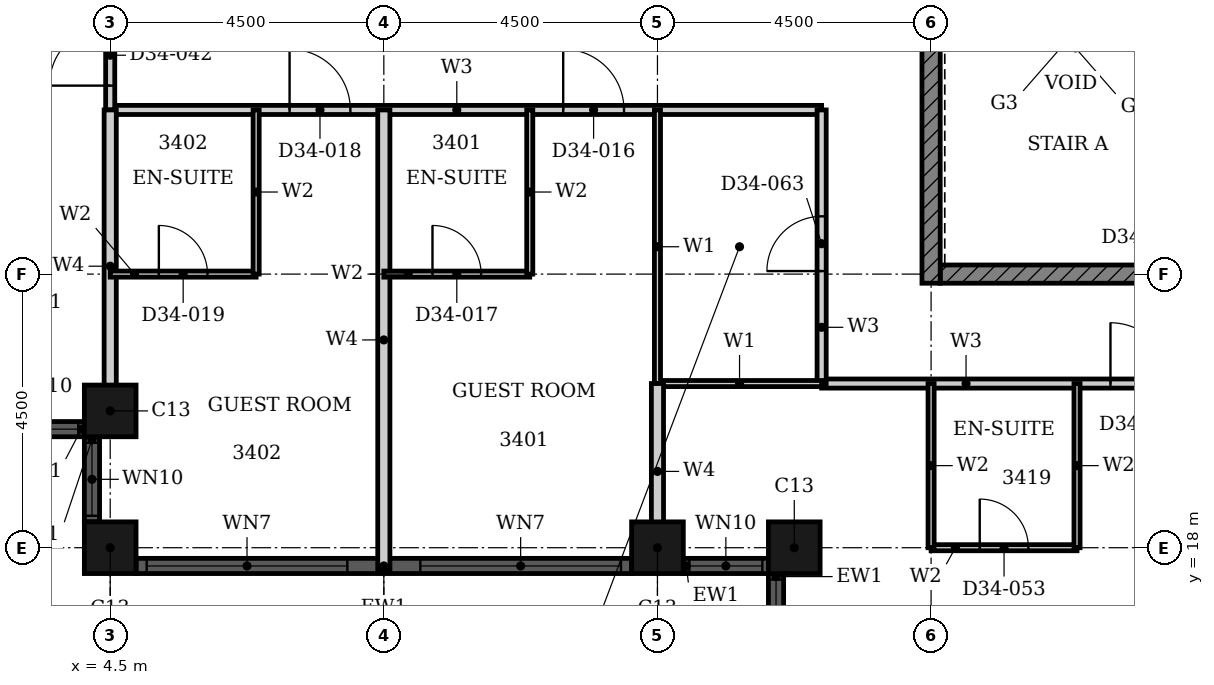
"""IFC4 building model, lengths in metres.
Left out: names, types, materials, properties, quantities, classifications, styles, units other than length and angle.
Written with IfcOpenShell. Run it as: python <this file> out.ifc"""

import sys

from ifc_helpers import new_model, si_unit, direction, frame, frame_2d, origin, origin_2d, place, context, subcontext, project, spatial, rectangle, hollow_rectangle, extrude, element, fill, save


model = new_model("IFC4")
c1 = context("Model", 3, precision=1e-05, world=origin(), true_north=direction((0.0, 1.0)))
c2 = subcontext(c1, "Body", "Model", "MODEL_VIEW")
j1 = project(units=[si_unit("LENGTHUNIT", "METRE"), si_unit("PLANEANGLEUNIT", "RADIAN")], contexts=[c1])
p1 = place(None, origin())
s1 = spatial("IfcSite", under=j1, at=p1, CompositionType="ELEMENT")
p2 = place(p1, origin())
s2 = spatial("IfcBuilding", under=s1, at=p2, CompositionType="ELEMENT")
p3 = place(p2, frame((0.0, 0.0, 136.8)))
s3 = spatial("IfcBuildingStorey", under=s2, at=p3, CompositionType="ELEMENT", Elevation=136.8)
for number, where, z_axis, x_axis in (
    (1, (4.5, 20.25, 0.0), (0.0, 0.0, 1.0), (1.0, 0.0, 0.0)),
    (2, (4.5, 18.0, 0.0), (0.0, 0.0, 1.0), (1.0, 0.0, 0.0)),
    (3, (13.5, 18.0, 0.0), (0.0, 0.0, 1.0), (1.0, 0.0, 0.0)),
    (4, (15.75, 18.0, 0.0), (0.0, 0.0, 1.0), (1.0, 0.0, 0.0)),
):
    element("IfcColumn", number, at=place(p3, frame(where, z_axis=z_axis, x_axis=x_axis)), inside=s3, PredefinedType="COLUMN", context=c2, shape_type="SweptSolid", body=[
        extrude(hollow_rectangle(XDim=0.85, YDim=0.85, WallThickness=0.026, at=origin_2d()), origin(), (0.0, 0.0, 1.0), 3.6),
    ])
p4 = place(p3, frame((2.675, 19.95, 0.0), z_axis=(0.0, 0.0, 1.0), x_axis=(1.0, 0.0, 0.0)))
e5 = element("IfcWall", 5, at=p4, inside=s3, PredefinedType="SOLIDWALL", context=c2, shape_type="SweptSolid", body=[
    extrude(rectangle(XDim=1.4, YDim=0.25, at=frame_2d((0.7, 0.0))), origin(), (0.0, 0.0, 1.0), 3.6),
])
p5 = place(p4, frame((0.1, 0.0, 0.9)))
e6 = element("IfcOpeningElement", 6, at=p5, cuts=e5, PredefinedType="OPENING", context=c2, shape_type="SweptSolid", body=[
    extrude(rectangle(XDim=1.2, YDim=1.85, at=frame_2d((0.6, 0.925))), frame((0.0, 0.135, 0.0), z_axis=(0.0, -1.0, 0.0), x_axis=(1.0, 0.0, 0.0)), (0.0, 0.0, 1.0), 0.27),
])
p6 = place(p3, frame((4.2, 19.825, 0.0), z_axis=(0.0, 0.0, 1.0), x_axis=(0.0, -1.0, 0.0)))
e7 = element("IfcWall", 7, at=p6, inside=s3, PredefinedType="SOLIDWALL", context=c2, shape_type="SweptSolid", body=[
    extrude(rectangle(XDim=1.4, YDim=0.25, at=frame_2d((0.7, 0.0))), origin(), (0.0, 0.0, 1.0), 3.6),
])
p7 = place(p6, frame((0.1, 0.0, 0.9)))
e8 = element("IfcOpeningElement", 8, at=p7, cuts=e7, PredefinedType="OPENING", context=c2, shape_type="SweptSolid", body=[
    extrude(rectangle(XDim=1.2, YDim=1.85, at=frame_2d((0.6, 0.925))), frame((0.0, 0.135, 0.0), z_axis=(0.0, -1.0, 0.0), x_axis=(1.0, 0.0, 0.0)), (0.0, 0.0, 1.0), 0.27),
])
p8 = place(p3, frame((4.925, 17.7, 0.0), z_axis=(0.0, 0.0, 1.0), x_axis=(1.0, 0.0, 0.0)))
e9 = element("IfcWall", 9, at=p8, inside=s3, PredefinedType="SOLIDWALL", context=c2, shape_type="SweptSolid", body=[
    extrude(rectangle(XDim=8.15, YDim=0.25, at=frame_2d((4.075, 0.0))), origin(), (0.0, 0.0, 1.0), 3.6),
])
p9 = place(p8, frame((0.175, 0.0, 0.9)))
e10 = element("IfcOpeningElement", 10, at=p9, cuts=e9, PredefinedType="OPENING", context=c2, shape_type="SweptSolid", body=[
    extrude(rectangle(XDim=3.3, YDim=1.85, at=frame_2d((1.65, 0.925))), frame((0.0, 0.135, 0.0), z_axis=(0.0, -1.0, 0.0), x_axis=(1.0, 0.0, 0.0)), (0.0, 0.0, 1.0), 0.27),
])
p10 = place(p8, frame((4.675, 0.0, 0.9)))
e11 = element("IfcOpeningElement", 11, at=p10, cuts=e9, PredefinedType="OPENING", context=c2, shape_type="SweptSolid", body=[
    extrude(rectangle(XDim=3.3, YDim=1.85, at=frame_2d((1.65, 0.925))), frame((0.0, 0.135, 0.0), z_axis=(0.0, -1.0, 0.0), x_axis=(1.0, 0.0, 0.0)), (0.0, 0.0, 1.0), 0.27),
])
p11 = place(p3, frame((13.925, 17.7, 0.0), z_axis=(0.0, 0.0, 1.0), x_axis=(1.0, 0.0, 0.0)))
e12 = element("IfcWall", 12, at=p11, inside=s3, PredefinedType="SOLIDWALL", context=c2, shape_type="SweptSolid", body=[
    extrude(rectangle(XDim=1.4, YDim=0.25, at=frame_2d((0.7, 0.0))), origin(), (0.0, 0.0, 1.0), 3.6),
])
p12 = place(p11, frame((0.1, 0.0, 0.9)))
e13 = element("IfcOpeningElement", 13, at=p12, cuts=e12, PredefinedType="OPENING", context=c2, shape_type="SweptSolid", body=[
    extrude(rectangle(XDim=1.2, YDim=1.85, at=frame_2d((0.6, 0.925))), frame((0.0, 0.135, 0.0), z_axis=(0.0, -1.0, 0.0), x_axis=(1.0, 0.0, 0.0)), (0.0, 0.0, 1.0), 0.27),
])
p13 = place(p3, frame((15.45, 17.575, 0.0), z_axis=(0.0, 0.0, 1.0), x_axis=(0.0, -1.0, 0.0)))
e14 = element("IfcWall", 14, at=p13, inside=s3, PredefinedType="SOLIDWALL", context=c2, shape_type="SweptSolid", body=[
    extrude(rectangle(XDim=1.4, YDim=0.25, at=frame_2d((0.7, 0.0))), origin(), (0.0, 0.0, 1.0), 3.6),
])
p14 = place(p13, frame((0.1, 0.0, 0.9)))
e15 = element("IfcOpeningElement", 15, at=p14, cuts=e14, PredefinedType="OPENING", context=c2, shape_type="SweptSolid", body=[
    extrude(rectangle(XDim=1.2, YDim=1.85, at=frame_2d((0.6, 0.925))), frame((0.0, 0.135, 0.0), z_axis=(0.0, -1.0, 0.0), x_axis=(1.0, 0.0, 0.0)), (0.0, 0.0, 1.0), 0.27),
])
p15 = place(p3, frame((18.15, 22.5, 0.0), z_axis=(0.0, 0.0, 1.0), x_axis=(1.0, 0.0, 0.0)))
e16 = element("IfcWall", 16, at=p15, inside=s3, PredefinedType="SHEAR", context=c2, shape_type="SweptSolid", body=[
    extrude(rectangle(XDim=4.225, YDim=0.3, at=frame_2d((2.113, 0.0))), origin(), (0.0, 0.0, 1.0), 3.2),
])
p16 = place(p3, frame((18.0, 22.35, 0.0), z_axis=(0.0, 0.0, 1.0), x_axis=(0.0, 1.0, 0.0)))
e17 = element("IfcWall", 17, at=p16, inside=s3, PredefinedType="SHEAR", context=c2, shape_type="SweptSolid", body=[
    extrude(rectangle(XDim=9.3, YDim=0.3, at=frame_2d((4.65, 0.0))), origin(), (0.0, 0.0, 1.0), 3.2),
])
p17 = place(p3, frame((16.2, 20.7, 0.0), z_axis=(0.0, 0.0, 1.0), x_axis=(1.0, 0.0, 0.0)))
e18 = element("IfcWall", 18, at=p17, inside=s3, PredefinedType="PARTITIONING", context=c2, shape_type="SweptSolid", body=[
    extrude(rectangle(XDim=13.5, YDim=0.15, at=frame_2d((6.75, 0.0))), origin(), (0.0, 0.0, 1.0), 3.2),
])
p18 = place(p17, frame((4.75, 0.0, 0.0)))
e19 = element("IfcOpeningElement", 19, at=p18, cuts=e18, PredefinedType="OPENING", context=c2, shape_type="SweptSolid", body=[
    extrude(rectangle(XDim=1.0, YDim=2.1, at=frame_2d((0.5, 1.05))), frame((0.0, 0.085, 0.0), z_axis=(0.0, -1.0, 0.0), x_axis=(1.0, 0.0, 0.0)), (0.0, 0.0, 1.0), 0.17),
])
p19 = place(p17, frame((9.45, 0.0, 0.0)))
e20 = element("IfcOpeningElement", 20, at=p19, cuts=e18, PredefinedType="OPENING", context=c2, shape_type="SweptSolid", body=[
    extrude(rectangle(XDim=0.9, YDim=2.1, at=frame_2d((0.45, 1.05))), frame((0.0, 0.085, 0.0), z_axis=(0.0, -1.0, 0.0), x_axis=(1.0, 0.0, 0.0)), (0.0, 0.0, 1.0), 0.17),
])
p20 = place(p3, frame((4.5, 25.2, 0.0), z_axis=(0.0, 0.0, 1.0), x_axis=(1.0, 0.0, 0.0)))
e21 = element("IfcWall", 21, at=p20, inside=s3, PredefinedType="PARTITIONING", context=c2, shape_type="SweptSolid", body=[
    extrude(rectangle(XDim=11.7, YDim=0.15, at=frame_2d((5.85, 0.0))), origin(), (0.0, 0.0, 1.0), 3.2),
])
p21 = place(p20, frame((7.45, 0.0, 0.0)))
e22 = element("IfcOpeningElement", 22, at=p21, cuts=e21, PredefinedType="OPENING", context=c2, shape_type="SweptSolid", body=[
    extrude(rectangle(XDim=1.0, YDim=2.1, at=frame_2d((0.5, 1.05))), frame((0.0, 0.085, 0.0), z_axis=(0.0, -1.0, 0.0), x_axis=(1.0, 0.0, 0.0)), (0.0, 0.0, 1.0), 0.17),
])
p22 = place(p20, frame((2.95, 0.0, 0.0)))
e23 = element("IfcOpeningElement", 23, at=p22, cuts=e21, PredefinedType="OPENING", context=c2, shape_type="SweptSolid", body=[
    extrude(rectangle(XDim=1.0, YDim=2.1, at=frame_2d((0.5, 1.05))), frame((0.0, 0.085, 0.0), z_axis=(0.0, -1.0, 0.0), x_axis=(1.0, 0.0, 0.0)), (0.0, 0.0, 1.0), 0.17),
])
p23 = place(p3, frame((16.2, 20.7, 0.0), z_axis=(0.0, 0.0, 1.0), x_axis=(0.0, 1.0, 0.0)))
e24 = element("IfcWall", 24, at=p23, inside=s3, PredefinedType="PARTITIONING", context=c2, shape_type="SweptSolid", body=[
    extrude(rectangle(XDim=4.5, YDim=0.15, at=frame_2d((2.25, 0.0))), origin(), (0.0, 0.0, 1.0), 3.2),
])
p24 = place(p23, frame((1.85, 0.0, 0.0)))
e25 = element("IfcOpeningElement", 25, at=p24, cuts=e24, PredefinedType="OPENING", context=c2, shape_type="SweptSolid", body=[
    extrude(rectangle(XDim=0.9, YDim=2.1, at=frame_2d((0.45, 1.05))), frame((0.0, 0.085, 0.0), z_axis=(0.0, -1.0, 0.0), x_axis=(1.0, 0.0, 0.0)), (0.0, 0.0, 1.0), 0.17),
])
p25 = place(p3, frame((4.5, 25.2, 0.0), z_axis=(0.0, 0.0, 1.0), x_axis=(0.0, 1.0, 0.0)))
e26 = element("IfcWall", 26, at=p25, inside=s3, PredefinedType="PARTITIONING", context=c2, shape_type="SweptSolid", body=[
    extrude(rectangle(XDim=1.8, YDim=0.15, at=frame_2d((0.9, 0.0))), origin(), (0.0, 0.0, 1.0), 3.2),
])
p26 = place(p25, frame((0.4, 0.0, 0.0)))
e27 = element("IfcOpeningElement", 27, at=p26, cuts=e26, PredefinedType="OPENING", context=c2, shape_type="SweptSolid", body=[
    extrude(rectangle(XDim=1.0, YDim=2.1, at=frame_2d((0.5, 1.05))), frame((0.0, 0.085, 0.0), z_axis=(0.0, -1.0, 0.0), x_axis=(1.0, 0.0, 0.0)), (0.0, 0.0, 1.0), 0.17),
])
p27 = place(p3, frame((13.5, 20.7, 0.0), z_axis=(0.0, 0.0, 1.0), x_axis=(1.0, 0.0, 0.0)))
e28 = element("IfcWall", 28, at=p27, inside=s3, PredefinedType="PARTITIONING", context=c2, shape_type="SweptSolid", body=[
    extrude(rectangle(XDim=2.7, YDim=0.1, at=frame_2d((1.35, 0.0))), origin(), (0.0, 0.0, 1.0), 3.2),
])
p28 = place(p3, frame((13.5, 20.7, 0.0), z_axis=(0.0, 0.0, 1.0), x_axis=(0.0, 1.0, 0.0)))
e29 = element("IfcWall", 29, at=p28, inside=s3, PredefinedType="PARTITIONING", context=c2, shape_type="SweptSolid", body=[
    extrude(rectangle(XDim=4.5, YDim=0.1, at=frame_2d((2.25, 0.0))), origin(), (0.0, 0.0, 1.0), 2.28),
])
p29 = place(p3, frame((13.5, 17.81, 0.0), z_axis=(0.0, 0.0, 1.0), x_axis=(0.0, 1.0, 0.0)))
e30 = element("IfcWall", 30, at=p29, inside=s3, PredefinedType="PARTITIONING", context=c2, shape_type="SweptSolid", body=[
    extrude(rectangle(XDim=2.89, YDim=0.2, at=frame_2d((1.445, 0.0))), origin(), (0.0, 0.0, 1.0), 2.28),
])
p30 = place(p3, frame((4.5, 20.06, 0.0), z_axis=(0.0, 0.0, 1.0), x_axis=(0.0, 1.0, 0.0)))
e31 = element("IfcWall", 31, at=p30, inside=s3, PredefinedType="PARTITIONING", context=c2, shape_type="SweptSolid", body=[
    extrude(rectangle(XDim=5.14, YDim=0.2, at=frame_2d((2.57, 0.0))), origin(), (0.0, 0.0, 1.0), 3.2),
])
p31 = place(p3, frame((9.0, 17.635, 0.0), z_axis=(0.0, 0.0, 1.0), x_axis=(0.0, 1.0, 0.0)))
e32 = element("IfcWall", 32, at=p31, inside=s3, PredefinedType="PARTITIONING", context=c2, shape_type="SweptSolid", body=[
    extrude(rectangle(XDim=7.565, YDim=0.2, at=frame_2d((3.782, 0.0))), origin(), (0.0, 0.0, 1.0), 3.2),
])
p32 = place(p3, frame((18.0, 18.0, 0.0), z_axis=(0.0, 0.0, 1.0), x_axis=(1.0, 0.0, 0.0)))
e33 = element("IfcWall", 33, at=p32, inside=s3, PredefinedType="PARTITIONING", context=c2, shape_type="SweptSolid", body=[
    extrude(rectangle(XDim=2.4, YDim=0.1, at=frame_2d((1.2, 0.0))), origin(), (0.0, 0.0, 1.0), 3.2),
])
p33 = place(p32, frame((0.8, 0.0, 0.0)))
e34 = element("IfcOpeningElement", 34, at=p33, cuts=e33, PredefinedType="OPENING", context=c2, shape_type="SweptSolid", body=[
    extrude(rectangle(XDim=0.8, YDim=2.1, at=frame_2d((0.4, 1.05))), frame((0.0, 0.06, 0.0), z_axis=(0.0, -1.0, 0.0), x_axis=(1.0, 0.0, 0.0)), (0.0, 0.0, 1.0), 0.12),
])
p34 = place(p3, frame((9.0, 22.5, 0.0), z_axis=(0.0, 0.0, 1.0), x_axis=(1.0, 0.0, 0.0)))
e35 = element("IfcWall", 35, at=p34, inside=s3, PredefinedType="PARTITIONING", context=c2, shape_type="SweptSolid", body=[
    extrude(rectangle(XDim=2.4, YDim=0.1, at=frame_2d((1.2, 0.0))), origin(), (0.0, 0.0, 1.0), 2.48),
])
p35 = place(p34, frame((0.8, 0.0, 0.0)))
e36 = element("IfcOpeningElement", 36, at=p35, cuts=e35, PredefinedType="OPENING", context=c2, shape_type="SweptSolid", body=[
    extrude(rectangle(XDim=0.8, YDim=2.1, at=frame_2d((0.4, 1.05))), frame((0.0, 0.06, 0.0), z_axis=(0.0, -1.0, 0.0), x_axis=(1.0, 0.0, 0.0)), (0.0, 0.0, 1.0), 0.12),
])
p36 = place(p3, frame((4.5, 22.5, 0.0), z_axis=(0.0, 0.0, 1.0), x_axis=(1.0, 0.0, 0.0)))
e37 = element("IfcWall", 37, at=p36, inside=s3, PredefinedType="PARTITIONING", context=c2, shape_type="SweptSolid", body=[
    extrude(rectangle(XDim=2.4, YDim=0.1, at=frame_2d((1.2, 0.0))), origin(), (0.0, 0.0, 1.0), 2.48),
])
p37 = place(p36, frame((0.8, 0.0, 0.0)))
e38 = element("IfcOpeningElement", 38, at=p37, cuts=e37, PredefinedType="OPENING", context=c2, shape_type="SweptSolid", body=[
    extrude(rectangle(XDim=0.8, YDim=2.1, at=frame_2d((0.4, 1.05))), frame((0.0, 0.06, 0.0), z_axis=(0.0, -1.0, 0.0), x_axis=(1.0, 0.0, 0.0)), (0.0, 0.0, 1.0), 0.12),
])
for number, where, z_axis, x_axis in (
    (39, (11.4, 22.5, 0.0), (0.0, 0.0, 1.0), (0.0, 1.0, 0.0)),
    (40, (18.0, 18.0, 0.0), (0.0, 0.0, 1.0), (0.0, 1.0, 0.0)),
    (41, (20.4, 18.0, 0.0), (0.0, 0.0, 1.0), (0.0, 1.0, 0.0)),
    (42, (6.9, 22.5, 0.0), (0.0, 0.0, 1.0), (0.0, 1.0, 0.0)),
):
    element("IfcWall", number, at=place(p3, frame(where, z_axis=z_axis, x_axis=x_axis)), inside=s3, PredefinedType="PARTITIONING", context=c2, shape_type="SweptSolid", body=[
        extrude(rectangle(XDim=2.7, YDim=0.1, at=frame_2d((1.35, 0.0))), origin(), (0.0, 0.0, 1.0), 3.2),
    ])
p38 = place(p5, origin())
e43 = element("IfcWindow", 43, at=p38, inside=s3, PartitioningType="SINGLE_PANEL", PredefinedType="WINDOW", context=c2, shape_type="SweptSolid", body=[
    extrude(rectangle(XDim=1.2, YDim=1.85, at=frame_2d((0.6, 0.925))), frame((0.0, 0.03, 0.0), z_axis=(0.0, -1.0, 0.0), x_axis=(1.0, 0.0, 0.0)), (0.0, 0.0, 1.0), 0.06),
])
fill(e6, e43)
p39 = place(p7, origin())
e44 = element("IfcWindow", 44, at=p39, inside=s3, PartitioningType="SINGLE_PANEL", PredefinedType="WINDOW", context=c2, shape_type="SweptSolid", body=[
    extrude(rectangle(XDim=1.2, YDim=1.85, at=frame_2d((0.6, 0.925))), frame((0.0, 0.03, 0.0), z_axis=(0.0, -1.0, 0.0), x_axis=(1.0, 0.0, 0.0)), (0.0, 0.0, 1.0), 0.06),
])
fill(e8, e44)
p40 = place(p9, origin())
e45 = element("IfcWindow", 45, at=p40, inside=s3, PartitioningType="SINGLE_PANEL", PredefinedType="WINDOW", context=c2, shape_type="SweptSolid", body=[
    extrude(rectangle(XDim=3.3, YDim=1.85, at=frame_2d((1.65, 0.925))), frame((0.0, 0.03, 0.0), z_axis=(0.0, -1.0, 0.0), x_axis=(1.0, 0.0, 0.0)), (0.0, 0.0, 1.0), 0.06),
])
fill(e10, e45)
p41 = place(p10, origin())
e46 = element("IfcWindow", 46, at=p41, inside=s3, PartitioningType="SINGLE_PANEL", PredefinedType="WINDOW", context=c2, shape_type="SweptSolid", body=[
    extrude(rectangle(XDim=3.3, YDim=1.85, at=frame_2d((1.65, 0.925))), frame((0.0, 0.03, 0.0), z_axis=(0.0, -1.0, 0.0), x_axis=(1.0, 0.0, 0.0)), (0.0, 0.0, 1.0), 0.06),
])
fill(e11, e46)
p42 = place(p12, origin())
e47 = element("IfcWindow", 47, at=p42, inside=s3, PartitioningType="SINGLE_PANEL", PredefinedType="WINDOW", context=c2, shape_type="SweptSolid", body=[
    extrude(rectangle(XDim=1.2, YDim=1.85, at=frame_2d((0.6, 0.925))), frame((0.0, 0.03, 0.0), z_axis=(0.0, -1.0, 0.0), x_axis=(1.0, 0.0, 0.0)), (0.0, 0.0, 1.0), 0.06),
])
fill(e13, e47)
p43 = place(p14, origin())
e48 = element("IfcWindow", 48, at=p43, inside=s3, PartitioningType="SINGLE_PANEL", PredefinedType="WINDOW", context=c2, shape_type="SweptSolid", body=[
    extrude(rectangle(XDim=1.2, YDim=1.85, at=frame_2d((0.6, 0.925))), frame((0.0, 0.03, 0.0), z_axis=(0.0, -1.0, 0.0), x_axis=(1.0, 0.0, 0.0)), (0.0, 0.0, 1.0), 0.06),
])
fill(e15, e48)
p44 = place(p21, origin())
e49 = element("IfcDoor", 49, at=p44, inside=s3, OperationType="SINGLE_SWING_RIGHT", PredefinedType="DOOR", context=c2, shape_type="SweptSolid", body=[
    extrude(rectangle(XDim=1.0, YDim=2.1, at=frame_2d((0.5, 1.05))), frame((0.0, 0.025, 0.0), z_axis=(0.0, -1.0, 0.0), x_axis=(1.0, 0.0, 0.0)), (0.0, 0.0, 1.0), 0.05),
])
fill(e22, e49)
p45 = place(p35, origin())
e50 = element("IfcDoor", 50, at=p45, inside=s3, OperationType="SINGLE_SWING_RIGHT", PredefinedType="DOOR", context=c2, shape_type="SweptSolid", body=[
    extrude(rectangle(XDim=0.8, YDim=2.1, at=frame_2d((0.4, 1.05))), frame((0.0, 0.025, 0.0), z_axis=(0.0, -1.0, 0.0), x_axis=(1.0, 0.0, 0.0)), (0.0, 0.0, 1.0), 0.05),
])
fill(e36, e50)
p46 = place(p22, origin())
e51 = element("IfcDoor", 51, at=p46, inside=s3, OperationType="SINGLE_SWING_RIGHT", PredefinedType="DOOR", context=c2, shape_type="SweptSolid", body=[
    extrude(rectangle(XDim=1.0, YDim=2.1, at=frame_2d((0.5, 1.05))), frame((0.0, 0.025, 0.0), z_axis=(0.0, -1.0, 0.0), x_axis=(1.0, 0.0, 0.0)), (0.0, 0.0, 1.0), 0.05),
])
fill(e23, e51)
p47 = place(p37, origin())
e52 = element("IfcDoor", 52, at=p47, inside=s3, OperationType="SINGLE_SWING_LEFT", PredefinedType="DOOR", context=c2, shape_type="SweptSolid", body=[
    extrude(rectangle(XDim=0.8, YDim=2.1, at=frame_2d((0.4, 1.05))), frame((0.0, 0.025, 0.0), z_axis=(0.0, -1.0, 0.0), x_axis=(1.0, 0.0, 0.0)), (0.0, 0.0, 1.0), 0.05),
])
fill(e38, e52)
p48 = place(p26, origin())
e53 = element("IfcDoor", 53, at=p48, inside=s3, OperationType="SINGLE_SWING_RIGHT", PredefinedType="DOOR", context=c2, shape_type="SweptSolid", body=[
    extrude(rectangle(XDim=1.0, YDim=2.1, at=frame_2d((0.5, 1.05))), frame((0.0, 0.025, 0.0), z_axis=(0.0, -1.0, 0.0), x_axis=(1.0, 0.0, 0.0)), (0.0, 0.0, 1.0), 0.05),
])
fill(e27, e53)
p49 = place(p18, origin())
e54 = element("IfcDoor", 54, at=p49, inside=s3, OperationType="SINGLE_SWING_RIGHT", PredefinedType="DOOR", context=c2, shape_type="SweptSolid", body=[
    extrude(rectangle(XDim=1.0, YDim=2.1, at=frame_2d((0.5, 1.05))), frame((0.0, 0.025, 0.0), z_axis=(0.0, -1.0, 0.0), x_axis=(1.0, 0.0, 0.0)), (0.0, 0.0, 1.0), 0.05),
])
fill(e19, e54)
p50 = place(p33, origin())
e55 = element("IfcDoor", 55, at=p50, inside=s3, OperationType="SINGLE_SWING_RIGHT", PredefinedType="DOOR", context=c2, shape_type="SweptSolid", body=[
    extrude(rectangle(XDim=0.8, YDim=2.1, at=frame_2d((0.4, 1.05))), frame((0.0, 0.025, 0.0), z_axis=(0.0, -1.0, 0.0), x_axis=(1.0, 0.0, 0.0)), (0.0, 0.0, 1.0), 0.05),
])
fill(e34, e55)
p51 = place(p24, origin())
e56 = element("IfcDoor", 56, at=p51, inside=s3, OperationType="SINGLE_SWING_LEFT", PredefinedType="DOOR", context=c2, shape_type="SweptSolid", body=[
    extrude(rectangle(XDim=0.9, YDim=2.1, at=frame_2d((0.45, 1.05))), frame((0.0, 0.025, 0.0), z_axis=(0.0, -1.0, 0.0), x_axis=(1.0, 0.0, 0.0)), (0.0, 0.0, 1.0), 0.05),
])
fill(e25, e56)
save(model, sys.argv[1])
